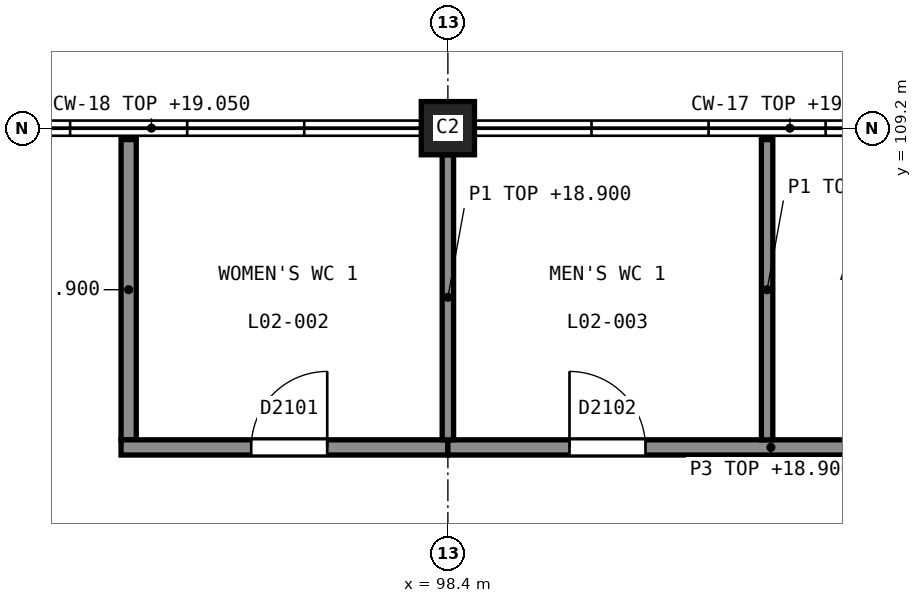
"""IFC4 building model, lengths in metres.
Left out: names, types, materials, properties, quantities, classifications, styles, units other than length and angle.
Written with IfcOpenShell. Run it as: python <this file> out.ifc"""

import sys

from ifc_helpers import new_model, si_unit, direction, frame, frame_2d, origin, origin_2d, place, context, subcontext, project, spatial, rectangle, extrude, element, fill, save


model = new_model("IFC4")
c1 = context("Model", 3, precision=1e-05, world=origin(), true_north=direction((0.0, 1.0)))
c2 = subcontext(c1, "Body", "Model", "MODEL_VIEW")
j1 = project(units=[si_unit("LENGTHUNIT", "METRE"), si_unit("PLANEANGLEUNIT", "RADIAN")], contexts=[c1])
p1 = place(None, origin())
s1 = spatial("IfcSite", under=j1, at=p1, CompositionType="ELEMENT")
p2 = place(p1, origin())
s2 = spatial("IfcBuilding", under=s1, at=p2, CompositionType="ELEMENT")
p3 = place(p2, frame((0.0, 0.0, 10.5)))
s3 = spatial("IfcBuildingStorey", under=s2, at=p3, CompositionType="ELEMENT", Elevation=10.5)
p4 = place(p3, frame((98.4, 109.2, 0.0), z_axis=(0.0, 0.0, 1.0), x_axis=(1.0, 0.0, 0.0)))
e1 = element("IfcColumn", 1, at=p4, inside=s3, PredefinedType="COLUMN", context=c2, shape_type="SweptSolid", body=[
    extrude(rectangle(XDim=0.7, YDim=0.7, at=origin_2d()), origin(), (0.0, 0.0, 1.0), 9.5),
])
p5 = place(p3, frame((94.2, 105.1, 0.0), z_axis=(0.0, 0.0, 1.0), x_axis=(0.0, 1.0, 0.0)))
e2 = element("IfcWall", 2, at=p5, inside=s3, PredefinedType="PARTITIONING", context=c2, shape_type="SweptSolid", body=[
    extrude(rectangle(XDim=3.95, YDim=0.2, at=frame_2d((1.975, 0.0))), origin(), (0.0, 0.0, 1.0), 8.4),
])
p6 = place(p3, frame((94.1, 105.0, 0.0), z_axis=(0.0, 0.0, 1.0), x_axis=(1.0, 0.0, 0.0)))
e3 = element("IfcWall", 3, at=p6, inside=s3, PredefinedType="PARTITIONING", context=c2, shape_type="SweptSolid", body=[
    extrude(rectangle(XDim=4.3, YDim=0.2, at=frame_2d((2.15, 0.0))), origin(), (0.0, 0.0, 1.0), 8.4),
])
p7 = place(p6, frame((1.712, 0.0, 0.0)))
e4 = element("IfcOpeningElement", 4, at=p7, cuts=e3, PredefinedType="OPENING", context=c2, shape_type="SweptSolid", body=[
    extrude(rectangle(XDim=1.0, YDim=2.1, at=frame_2d((0.5, 1.05))), frame((0.0, 0.11, 0.0), z_axis=(0.0, -1.0, 0.0), x_axis=(1.0, 0.0, 0.0)), (0.0, 0.0, 1.0), 0.22),
])
p8 = place(p3, frame((98.4, 105.0, 0.0), z_axis=(0.0, 0.0, 1.0), x_axis=(1.0, 0.0, 0.0)))
e5 = element("IfcWall", 5, at=p8, inside=s3, PredefinedType="PARTITIONING", context=c2, shape_type="SweptSolid", body=[
    extrude(rectangle(XDim=8.5, YDim=0.2, at=frame_2d((4.25, 0.0))), origin(), (0.0, 0.0, 1.0), 8.4),
])
p9 = place(p8, frame((1.6, 0.0, 0.0)))
e6 = element("IfcOpeningElement", 6, at=p9, cuts=e5, PredefinedType="OPENING", context=c2, shape_type="SweptSolid", body=[
    extrude(rectangle(XDim=1.0, YDim=2.1, at=frame_2d((0.5, 1.05))), frame((0.0, 0.11, 0.0), z_axis=(0.0, -1.0, 0.0), x_axis=(1.0, 0.0, 0.0)), (0.0, 0.0, 1.0), 0.22),
])
p10 = place(p8, frame((5.788, 0.0, 0.0)))
e7 = element("IfcOpeningElement", 7, at=p10, cuts=e5, PredefinedType="OPENING", context=c2, shape_type="SweptSolid", body=[
    extrude(rectangle(XDim=1.0, YDim=2.1, at=frame_2d((0.5, 1.05))), frame((0.0, 0.11, 0.0), z_axis=(0.0, -1.0, 0.0), x_axis=(1.0, 0.0, 0.0)), (0.0, 0.0, 1.0), 0.22),
])
p11 = place(p3, frame((98.4, 105.1, 0.0), z_axis=(0.0, 0.0, 1.0), x_axis=(0.0, 1.0, 0.0)))
e8 = element("IfcWall", 8, at=p11, inside=s3, PredefinedType="PARTITIONING", context=c2, shape_type="SweptSolid", body=[
    extrude(rectangle(XDim=3.75, YDim=0.15, at=frame_2d((1.875, 0.0))), origin(), (0.0, 0.0, 1.0), 8.4),
])
p12 = place(p3, frame((102.6, 105.1, 0.0), z_axis=(0.0, 0.0, 1.0), x_axis=(0.0, 1.0, 0.0)))
e9 = element("IfcWall", 9, at=p12, inside=s3, PredefinedType="PARTITIONING", context=c2, shape_type="SweptSolid", body=[
    extrude(rectangle(XDim=3.95, YDim=0.15, at=frame_2d((1.975, 0.0))), origin(), (0.0, 0.0, 1.0), 8.4),
])
p13 = place(p7, origin())
e10 = element("IfcDoor", 10, at=p13, inside=s3, OperationType="SINGLE_SWING_LEFT", PredefinedType="DOOR", context=c2, shape_type="SweptSolid", body=[
    extrude(rectangle(XDim=1.0, YDim=2.1, at=frame_2d((0.5, 1.05))), frame((0.0, 0.025, 0.0), z_axis=(0.0, -1.0, 0.0), x_axis=(1.0, 0.0, 0.0)), (0.0, 0.0, 1.0), 0.05),
])
fill(e4, e10)
p14 = place(p9, origin())
e11 = element("IfcDoor", 11, at=p14, inside=s3, OperationType="SINGLE_SWING_RIGHT", PredefinedType="DOOR", context=c2, shape_type="SweptSolid", body=[
    extrude(rectangle(XDim=1.0, YDim=2.1, at=frame_2d((0.5, 1.05))), frame((0.0, 0.025, 0.0), z_axis=(0.0, -1.0, 0.0), x_axis=(1.0, 0.0, 0.0)), (0.0, 0.0, 1.0), 0.05),
])
fill(e6, e11)
save(model, sys.argv[1])
